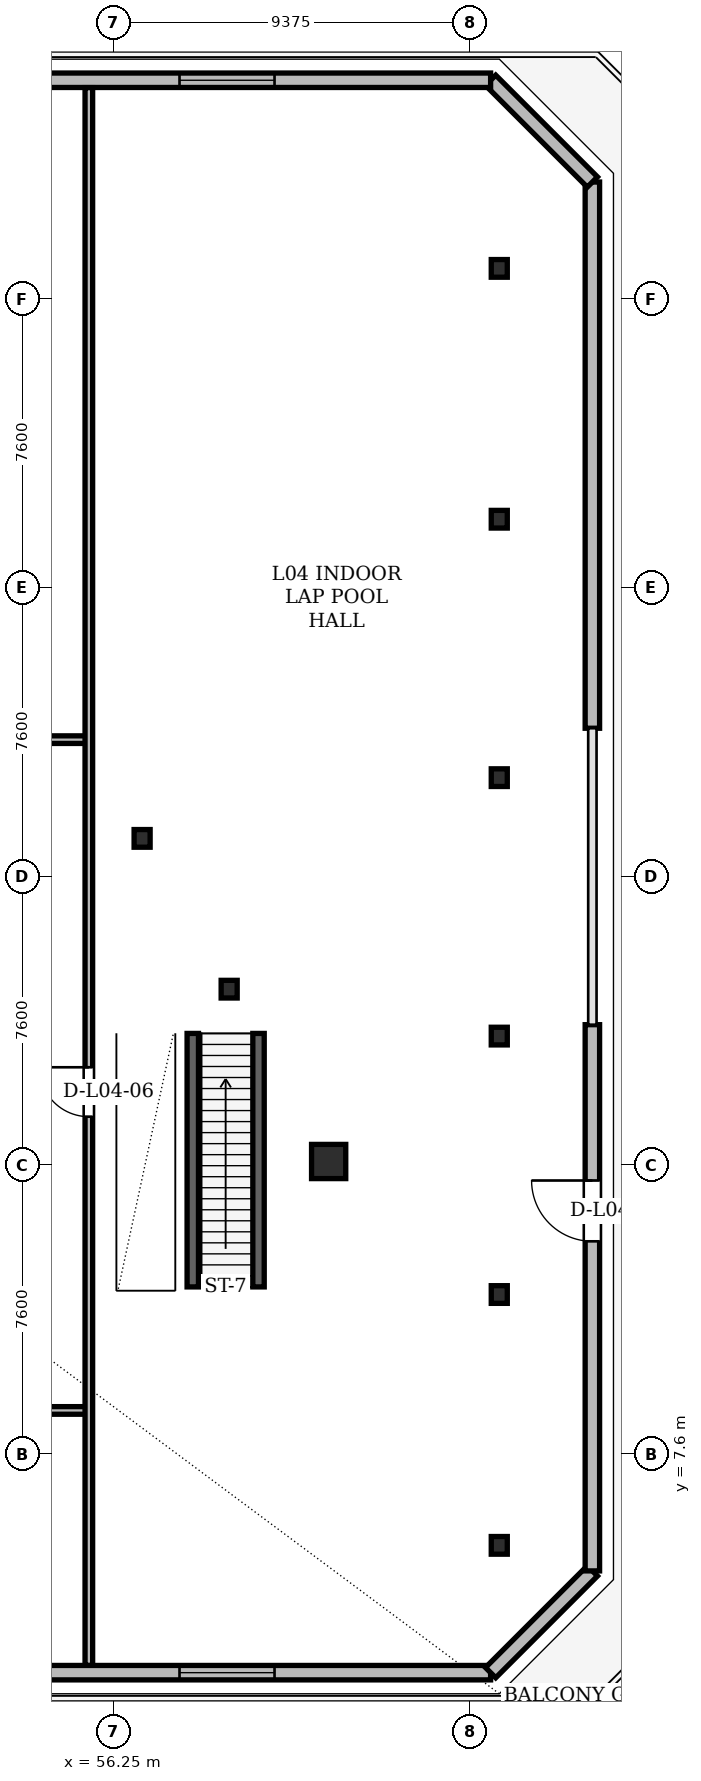
"""IFC4 building model, lengths in metres.
Left out: names, types, materials, properties, quantities, classifications, styles, units other than length and angle.
Written with IfcOpenShell. Run it as: python <this file> out.ifc"""

import sys

from ifc_helpers import new_model, si_unit, direction, frame, frame_2d, origin, origin_2d, place, context, subcontext, project, spatial, rectangle, hollow_rectangle, i_section, extrude, element, fill, save


model = new_model("IFC4")
c1 = context("Model", 3, precision=1e-05, world=origin(), true_north=direction((0.0, 1.0)))
c2 = subcontext(c1, "Body", "Model", "MODEL_VIEW")
j1 = project(units=[si_unit("LENGTHUNIT", "METRE"), si_unit("PLANEANGLEUNIT", "RADIAN")], contexts=[c1])
p1 = place(None, origin())
s1 = spatial("IfcSite", under=j1, at=p1, CompositionType="ELEMENT")
p2 = place(p1, origin())
s2 = spatial("IfcBuilding", under=s1, at=p2, CompositionType="ELEMENT")
p3 = place(p2, frame((0.0, 0.0, 18.3)))
s3 = spatial("IfcBuildingStorey", under=s2, at=p3, CompositionType="ELEMENT", Elevation=18.3)
p4 = place(p3, frame((61.91, 15.3, 0.004), z_axis=(0.0, 0.0, 1.0), x_axis=(1.0, 0.0, 0.0)))
e1 = element("IfcColumn", 1, at=p4, inside=s3, PredefinedType="COLUMN", context=c2, shape_type="SweptSolid", body=[
    extrude(hollow_rectangle(XDim=0.9, YDim=0.9, WallThickness=0.075, at=origin_2d()), origin(), (0.0, 0.0, 1.0), 4.191),
])
for number, where, z_axis, x_axis in (
    (2, (59.292, 19.834, 0.004), (0.0, 0.0, 1.0), (1.0, 0.0, 0.0)),
    (3, (57.002, 23.802, 0.004), (0.0, 0.0, 1.0), (1.0, 0.0, 0.0)),
):
    element("IfcColumn", number, at=place(p3, frame(where, z_axis=z_axis, x_axis=x_axis)), inside=s3, PredefinedType="COLUMN", context=c2, shape_type="SweptSolid", body=[
        extrude(i_section(OverallWidth=0.422, OverallDepth=0.465, WebThickness=0.045, FlangeThickness=0.072, at=origin_2d()), origin(), (0.0, 0.0, 1.0), 4.191),
    ])
for number, where, z_axis, x_axis in (
    (4, (66.4, 5.2, 0.0), (0.0, 0.0, 1.0), (1.0, 0.0, 0.0)),
    (5, (66.4, 11.8, 0.0), (0.0, 0.0, 1.0), (1.0, 0.0, 0.0)),
    (6, (66.4, 18.6, 0.0), (0.0, 0.0, 1.0), (1.0, 0.0, 0.0)),
    (7, (66.4, 25.4, 0.0), (0.0, 0.0, 1.0), (1.0, 0.0, 0.0)),
    (8, (66.4, 32.2, 0.0), (0.0, 0.0, 1.0), (1.0, 0.0, 0.0)),
    (9, (66.4, 38.8, 0.0), (0.0, 0.0, 1.0), (1.0, 0.0, 0.0)),
):
    element("IfcColumn", number, at=place(p3, frame(where, z_axis=z_axis, x_axis=x_axis)), inside=s3, PredefinedType="COLUMN", context=c2, shape_type="SweptSolid", body=[
        extrude(i_section(OverallWidth=0.422, OverallDepth=0.465, WebThickness=0.045, FlangeThickness=0.072, at=origin_2d()), origin(), (0.0, 0.0, 1.0), 4.2),
    ])
for number, where, z_axis, x_axis in (
    (10, (58.335, 12.0, 0.0), (0.0, 0.0, 1.0), (0.0, 1.0, 0.0)),
    (11, (60.065, 12.0, 0.0), (0.0, 0.0, 1.0), (0.0, 1.0, 0.0)),
):
    element("IfcWall", number, at=place(p3, frame(where, z_axis=z_axis, x_axis=x_axis)), inside=s3, PredefinedType="SHEAR", context=c2, shape_type="SweptSolid", body=[
        extrude(rectangle(XDim=6.67, YDim=0.3, at=frame_2d((3.335, 0.0))), origin(), (0.0, 0.0, 1.0), 3.88),
    ])
p5 = place(p3, frame((41.4, 1.85, 0.0), z_axis=(0.0, 0.0, 1.0), x_axis=(1.0, 0.0, 0.0)))
e12 = element("IfcWall", 12, at=p5, inside=s3, PredefinedType="SOLIDWALL", context=c2, shape_type="SweptSolid", body=[
    extrude(rectangle(XDim=24.772, YDim=0.38, at=frame_2d((12.386, 0.0))), origin(), (0.0, 0.0, 1.0), 2.943),
])
p6 = place(p5, frame((16.586, 0.0, 0.85)))
e13 = element("IfcOpeningElement", 13, at=p6, cuts=e12, PredefinedType="OPENING", context=c2, shape_type="SweptSolid", body=[
    extrude(rectangle(XDim=2.5, YDim=1.923, at=frame_2d((1.25, 0.961))), frame((0.0, 0.19, 0.0), z_axis=(0.0, -1.0, 0.0), x_axis=(1.0, 0.0, 0.0)), (0.0, 0.0, 1.0), 0.38),
])
p7 = place(p3, frame((66.172, 1.85, 0.0), z_axis=(0.0, 0.0, 1.0), x_axis=(0.707139013974, 0.707074546929, 0.0)))
e14 = element("IfcWall", 14, at=p7, inside=s3, PredefinedType="SOLIDWALL", context=c2, shape_type="SweptSolid", body=[
    extrude(rectangle(XDim=3.787, YDim=0.38, at=frame_2d((1.894, 0.0))), origin(), (0.0, 0.0, 1.0), 3.88),
])
p8 = place(p3, frame((68.85, 4.528, 0.0), z_axis=(0.0, 0.0, 1.0), x_axis=(0.0, 1.0, 0.0)))
e15 = element("IfcWall", 15, at=p8, inside=s3, PredefinedType="SOLIDWALL", context=c2, shape_type="SweptSolid", body=[
    extrude(rectangle(XDim=14.372, YDim=0.38, at=frame_2d((7.186, 0.0))), origin(), (0.0, 0.0, 1.0), 3.88),
])
p9 = place(p8, frame((8.672, 0.0, 0.0)))
e16 = element("IfcOpeningElement", 16, at=p9, cuts=e15, PredefinedType="OPENING", context=c2, shape_type="SweptSolid", body=[
    extrude(rectangle(XDim=1.6, YDim=2.2, at=frame_2d((0.8, 1.1))), frame((0.0, 0.19, 0.0), z_axis=(0.0, -1.0, 0.0), x_axis=(1.0, 0.0, 0.0)), (0.0, 0.0, 1.0), 0.38),
])
p10 = place(p3, frame((68.85, 26.7, 0.0), z_axis=(0.0, 0.0, 1.0), x_axis=(0.0, 1.0, 0.0)))
e17 = element("IfcWall", 17, at=p10, inside=s3, PredefinedType="SOLIDWALL", context=c2, shape_type="SweptSolid", body=[
    extrude(rectangle(XDim=14.372, YDim=0.38, at=frame_2d((7.186, 0.0))), origin(), (0.0, 0.0, 1.0), 3.88),
])
p11 = place(p3, frame((68.85, 41.072, 0.0), z_axis=(0.0, 0.0, 1.0), x_axis=(-0.707139013974, 0.707074546929, 0.0)))
e18 = element("IfcWall", 18, at=p11, inside=s3, PredefinedType="SOLIDWALL", context=c2, shape_type="SweptSolid", body=[
    extrude(rectangle(XDim=3.787, YDim=0.38, at=frame_2d((1.894, 0.0))), origin(), (0.0, 0.0, 1.0), 3.88),
])
p12 = place(p3, frame((66.172, 43.75, 0.0), z_axis=(0.0, 0.0, 1.0), x_axis=(-1.0, 0.0, 0.0)))
e19 = element("IfcWall", 19, at=p12, inside=s3, PredefinedType="SOLIDWALL", context=c2, shape_type="SweptSolid", body=[
    extrude(rectangle(XDim=24.772, YDim=0.38, at=frame_2d((12.386, 0.0))), origin(), (0.0, 0.0, 1.0), 2.943),
])
p13 = place(p12, frame((5.686, 0.0, 0.85)))
e20 = element("IfcOpeningElement", 20, at=p13, cuts=e19, PredefinedType="OPENING", context=c2, shape_type="SweptSolid", body=[
    extrude(rectangle(XDim=2.5, YDim=1.923, at=frame_2d((1.25, 0.961))), frame((0.0, 0.19, 0.0), z_axis=(0.0, -1.0, 0.0), x_axis=(1.0, 0.0, 0.0)), (0.0, 0.0, 1.0), 0.38),
])
p14 = place(p12, frame((16.586, 0.0, 0.85)))
e21 = element("IfcOpeningElement", 21, at=p14, cuts=e19, PredefinedType="OPENING", context=c2, shape_type="SweptSolid", body=[
    extrude(rectangle(XDim=2.5, YDim=1.923, at=frame_2d((1.25, 0.961))), frame((0.0, 0.19, 0.0), z_axis=(0.0, -1.0, 0.0), x_axis=(1.0, 0.0, 0.0)), (0.0, 0.0, 1.0), 0.38),
])
p15 = place(p3, frame((14.03, 8.75, 0.0), z_axis=(0.0, 0.0, 1.0), x_axis=(1.0, 0.0, 0.0)))
e22 = element("IfcWall", 22, at=p15, inside=s3, PredefinedType="PARTITIONING", context=c2, shape_type="SweptSolid", body=[
    extrude(rectangle(XDim=41.57, YDim=0.2, at=frame_2d((20.785, 0.0))), origin(), (0.0, 0.0, 1.0), 2.943),
])
p16 = place(p15, frame((20.035, 0.0, 0.0)))
e23 = element("IfcOpeningElement", 23, at=p16, cuts=e22, PredefinedType="OPENING", context=c2, shape_type="SweptSolid", body=[
    extrude(rectangle(XDim=1.3, YDim=2.2, at=frame_2d((0.65, 1.1))), frame((0.0, 0.1, 0.0), z_axis=(0.0, -1.0, 0.0), x_axis=(1.0, 0.0, 0.0)), (0.0, 0.0, 1.0), 0.2),
])
p17 = place(p3, frame((27.05, 26.4, 0.0), z_axis=(0.0, 0.0, 1.0), x_axis=(1.0, 0.0, 0.0)))
e24 = element("IfcWall", 24, at=p17, inside=s3, PredefinedType="PARTITIONING", context=c2, shape_type="SweptSolid", body=[
    extrude(rectangle(XDim=28.55, YDim=0.2, at=frame_2d((14.275, 0.0))), origin(), (0.0, 0.0, 1.0), 2.943),
])
p18 = place(p17, frame((2.885, 0.0, 0.0)))
e25 = element("IfcOpeningElement", 25, at=p18, cuts=e24, PredefinedType="OPENING", context=c2, shape_type="SweptSolid", body=[
    extrude(rectangle(XDim=0.88, YDim=2.08, at=frame_2d((0.44, 1.04))), frame((0.0, 0.1, 0.0), z_axis=(0.0, -1.0, 0.0), x_axis=(1.0, 0.0, 0.0)), (0.0, 0.0, 1.0), 0.2),
])
p19 = place(p17, frame((8.964, 0.0, 0.0)))
e26 = element("IfcOpeningElement", 26, at=p19, cuts=e24, PredefinedType="OPENING", context=c2, shape_type="SweptSolid", body=[
    extrude(rectangle(XDim=0.88, YDim=2.08, at=frame_2d((0.44, 1.04))), frame((0.0, 0.1, 0.0), z_axis=(0.0, -1.0, 0.0), x_axis=(1.0, 0.0, 0.0)), (0.0, 0.0, 1.0), 0.2),
])
p20 = place(p17, frame((14.688, 0.0, 0.0)))
e27 = element("IfcOpeningElement", 27, at=p20, cuts=e24, PredefinedType="OPENING", context=c2, shape_type="SweptSolid", body=[
    extrude(rectangle(XDim=0.88, YDim=2.08, at=frame_2d((0.44, 1.04))), frame((0.0, 0.1, 0.0), z_axis=(0.0, -1.0, 0.0), x_axis=(1.0, 0.0, 0.0)), (0.0, 0.0, 1.0), 0.2),
])
p21 = place(p3, frame((55.6, 2.044, 0.0), z_axis=(0.0, 0.0, 1.0), x_axis=(0.0, 1.0, 0.0)))
e28 = element("IfcWall", 28, at=p21, inside=s3, PredefinedType="PARTITIONING", context=c2, shape_type="SweptSolid", body=[
    extrude(rectangle(XDim=41.512, YDim=0.2, at=frame_2d((20.756, 0.0))), origin(), (0.0, 0.0, 1.0), 2.67),
])
p22 = place(p21, frame((14.435, 0.0, 0.0)))
e29 = element("IfcOpeningElement", 29, at=p22, cuts=e28, PredefinedType="OPENING", context=c2, shape_type="SweptSolid", body=[
    extrude(rectangle(XDim=1.3, YDim=2.2, at=frame_2d((0.65, 1.1))), frame((0.0, 0.1, 0.0), z_axis=(0.0, -1.0, 0.0), x_axis=(1.0, 0.0, 0.0)), (0.0, 0.0, 1.0), 0.2),
])
p23 = place(p6, origin())
e30 = element("IfcWindow", 30, at=p23, inside=s3, PartitioningType="SINGLE_PANEL", PredefinedType="WINDOW", context=c2, shape_type="SweptSolid", body=[
    extrude(rectangle(XDim=2.5, YDim=1.923, at=frame_2d((1.25, 0.961))), frame((0.0, 0.03, 0.0), z_axis=(0.0, -1.0, 0.0), x_axis=(1.0, 0.0, 0.0)), (0.0, 0.0, 1.0), 0.06),
])
fill(e13, e30)
p24 = place(p9, origin())
e31 = element("IfcDoor", 31, at=p24, inside=s3, OperationType="SINGLE_SWING_RIGHT", PredefinedType="DOOR", context=c2, shape_type="SweptSolid", body=[
    extrude(rectangle(XDim=1.6, YDim=2.2, at=frame_2d((0.8, 1.1))), frame((0.0, 0.025, 0.0), z_axis=(0.0, -1.0, 0.0), x_axis=(1.0, 0.0, 0.0)), (0.0, 0.0, 1.0), 0.05),
])
fill(e16, e31)
p25 = place(p13, origin())
e32 = element("IfcWindow", 32, at=p25, inside=s3, PartitioningType="SINGLE_PANEL", PredefinedType="WINDOW", context=c2, shape_type="SweptSolid", body=[
    extrude(rectangle(XDim=2.5, YDim=1.923, at=frame_2d((1.25, 0.961))), frame((0.0, 0.03, 0.0), z_axis=(0.0, -1.0, 0.0), x_axis=(1.0, 0.0, 0.0)), (0.0, 0.0, 1.0), 0.06),
])
fill(e20, e32)
p26 = place(p22, origin())
e33 = element("IfcDoor", 33, at=p26, inside=s3, OperationType="SINGLE_SWING_RIGHT", PredefinedType="DOOR", context=c2, shape_type="SweptSolid", body=[
    extrude(rectangle(XDim=1.3, YDim=2.2, at=frame_2d((0.65, 1.1))), frame((0.0, 0.025, 0.0), z_axis=(0.0, -1.0, 0.0), x_axis=(1.0, 0.0, 0.0)), (0.0, 0.0, 1.0), 0.05),
])
fill(e29, e33)
save(model, sys.argv[1])
